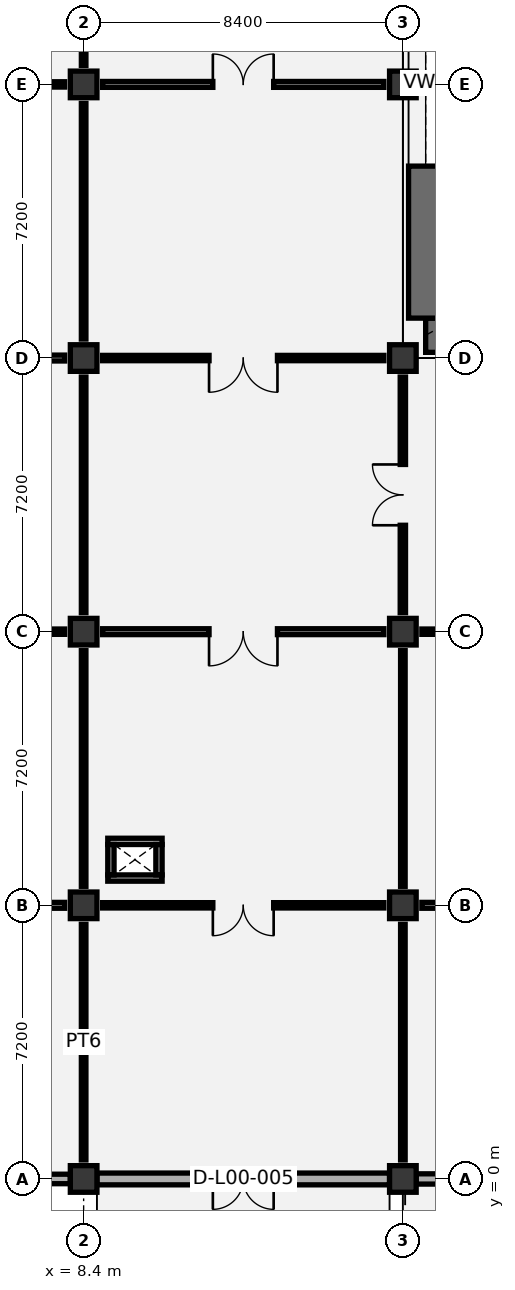
"""IFC4 building model, lengths in metres.
Left out: names, types, materials, properties, quantities, classifications, styles, units other than length and angle.
Written with IfcOpenShell. Run it as: python <this file> out.ifc"""

import sys

from ifc_helpers import new_model, si_unit, direction, frame, frame_2d, origin, origin_2d, place, context, subcontext, project, spatial, rectangle, extrude, element, fill, save


model = new_model("IFC4")
c1 = context("Model", 3, precision=1e-05, world=origin(), true_north=direction((0.0, 1.0)))
c2 = subcontext(c1, "Body", "Model", "MODEL_VIEW")
j1 = project(units=[si_unit("LENGTHUNIT", "METRE"), si_unit("PLANEANGLEUNIT", "RADIAN")], contexts=[c1])
p1 = place(None, origin())
s1 = spatial("IfcSite", under=j1, at=p1, CompositionType="ELEMENT")
p2 = place(p1, origin())
s2 = spatial("IfcBuilding", under=s1, at=p2, CompositionType="ELEMENT")
p3 = place(p2, origin())
s3 = spatial("IfcBuildingStorey", under=s2, at=p3, CompositionType="ELEMENT", Elevation=0.0)
for number, where, z_axis, x_axis in (
    (1, (8.4, 0.0, 0.0), (0.0, 0.0, 1.0), (1.0, 0.0, 0.0)),
    (2, (8.4, 7.2, 0.0), (0.0, 0.0, 1.0), (1.0, 0.0, 0.0)),
    (3, (8.4, 14.4, 0.0), (0.0, 0.0, 1.0), (1.0, 0.0, 0.0)),
    (4, (8.4, 21.6, 0.0), (0.0, 0.0, 1.0), (1.0, 0.0, 0.0)),
    (5, (8.4, 28.8, 0.0), (0.0, 0.0, 1.0), (1.0, 0.0, 0.0)),
    (6, (16.8, 0.0, 0.0), (0.0, 0.0, 1.0), (1.0, 0.0, 0.0)),
    (7, (16.8, 7.2, 0.0), (0.0, 0.0, 1.0), (1.0, 0.0, 0.0)),
    (8, (16.8, 14.4, 0.0), (0.0, 0.0, 1.0), (1.0, 0.0, 0.0)),
    (9, (16.8, 21.6, 0.0), (0.0, 0.0, 1.0), (1.0, 0.0, 0.0)),
    (10, (16.8, 28.8, 0.0), (0.0, 0.0, 1.0), (1.0, 0.0, 0.0)),
):
    element("IfcColumn", number, at=place(p3, frame(where, z_axis=z_axis, x_axis=x_axis)), inside=s3, PredefinedType="COLUMN", context=c2, shape_type="SweptSolid", body=[
        extrude(rectangle(XDim=0.7, YDim=0.7, at=origin_2d()), origin(), (0.0, 0.0, 1.0), 6.0),
    ])
p4 = place(p3, frame((17.4, 22.2, 0.0), z_axis=(0.0, 0.0, 1.0), x_axis=(1.0, 0.0, 0.0)))
e11 = element("IfcWall", 11, at=p4, inside=s3, PredefinedType="SOLIDWALL", context=c2, shape_type="SweptSolid", body=[
    extrude(rectangle(XDim=24.0, YDim=0.9, at=frame_2d((12.0, 0.0))), origin(), (0.0, 0.0, 1.0), 6.0),
])
p5 = place(p4, frame((2.4, 0.0, 0.8)))
e12 = element("IfcOpeningElement", 12, at=p5, cuts=e11, PredefinedType="OPENING", context=c2, shape_type="SweptSolid", body=[
    extrude(rectangle(XDim=6.4, YDim=3.2, at=frame_2d((3.2, 1.6))), frame((0.0, 0.46, 0.0), z_axis=(0.0, -1.0, 0.0), x_axis=(1.0, 0.0, 0.0)), (0.0, 0.0, 1.0), 0.92),
])
p6 = place(p4, frame((14.2, 0.0, 0.8)))
e13 = element("IfcOpeningElement", 13, at=p6, cuts=e11, PredefinedType="OPENING", context=c2, shape_type="SweptSolid", body=[
    extrude(rectangle(XDim=6.4, YDim=3.2, at=frame_2d((3.2, 1.6))), frame((0.0, 0.46, 0.0), z_axis=(0.0, -1.0, 0.0), x_axis=(1.0, 0.0, 0.0)), (0.0, 0.0, 1.0), 0.92),
])
p7 = place(p3, frame((17.4, 22.65, 0.0), z_axis=(0.0, 0.0, 1.0), x_axis=(0.0, 1.0, 0.0)))
e14 = element("IfcWall", 14, at=p7, inside=s3, PredefinedType="SOLIDWALL", context=c2, shape_type="SweptSolid", body=[
    extrude(rectangle(XDim=12.3, YDim=0.9, at=frame_2d((6.15, 0.0))), origin(), (0.0, 0.0, 1.0), 6.0),
])
p8 = place(p7, frame((4.0, 0.0, 0.9)))
e15 = element("IfcOpeningElement", 15, at=p8, cuts=e14, PredefinedType="OPENING", context=c2, shape_type="SweptSolid", body=[
    extrude(rectangle(XDim=4.4, YDim=2.8, at=frame_2d((2.2, 1.4))), frame((0.0, 0.46, 0.0), z_axis=(0.0, -1.0, 0.0), x_axis=(1.0, 0.0, 0.0)), (0.0, 0.0, 1.0), 0.92),
])
p9 = place(p3, frame((0.375, 0.0, 0.0), z_axis=(0.0, 0.0, 1.0), x_axis=(1.0, 0.0, 0.0)))
e16 = element("IfcWall", 16, at=p9, inside=s3, PredefinedType="SOLIDWALL", context=c2, shape_type="SweptSolid", body=[
    extrude(rectangle(XDim=7.675, YDim=0.25, at=frame_2d((3.837, 0.0))), origin(), (0.0, 0.0, 1.0), 5.12),
])
p10 = place(p9, frame((0.958, 0.0, 0.9)))
e17 = element("IfcOpeningElement", 17, at=p10, cuts=e16, PredefinedType="OPENING", context=c2, shape_type="SweptSolid", body=[
    extrude(rectangle(XDim=2.4, YDim=2.1, at=frame_2d((1.2, 1.05))), frame((0.0, 0.135, 0.0), z_axis=(0.0, -1.0, 0.0), x_axis=(1.0, 0.0, 0.0)), (0.0, 0.0, 1.0), 0.27),
])
p11 = place(p9, frame((4.317, 0.0, 0.9)))
e18 = element("IfcOpeningElement", 18, at=p11, cuts=e16, PredefinedType="OPENING", context=c2, shape_type="SweptSolid", body=[
    extrude(rectangle(XDim=2.4, YDim=2.1, at=frame_2d((1.2, 1.05))), frame((0.0, 0.135, 0.0), z_axis=(0.0, -1.0, 0.0), x_axis=(1.0, 0.0, 0.0)), (0.0, 0.0, 1.0), 0.27),
])
p12 = place(p3, frame((8.75, 0.0, 0.0), z_axis=(0.0, 0.0, 1.0), x_axis=(1.0, 0.0, 0.0)))
e19 = element("IfcWall", 19, at=p12, inside=s3, PredefinedType="SOLIDWALL", context=c2, shape_type="SweptSolid", body=[
    extrude(rectangle(XDim=7.7, YDim=0.31, at=frame_2d((3.85, 0.0))), origin(), (0.0, 0.0, 1.0), 5.12),
])
p13 = place(p12, frame((3.05, 0.0, 0.0)))
e20 = element("IfcOpeningElement", 20, at=p13, cuts=e19, PredefinedType="OPENING", context=c2, shape_type="SweptSolid", body=[
    extrude(rectangle(XDim=1.6, YDim=2.25, at=frame_2d((0.8, 1.125))), frame((0.0, 0.165, 0.0), z_axis=(0.0, -1.0, 0.0), x_axis=(1.0, 0.0, 0.0)), (0.0, 0.0, 1.0), 0.33),
])
p14 = place(p3, frame((17.15, 0.0, 0.0), z_axis=(0.0, 0.0, 1.0), x_axis=(1.0, 0.0, 0.0)))
e21 = element("IfcWall", 21, at=p14, inside=s3, PredefinedType="SOLIDWALL", context=c2, shape_type="SweptSolid", body=[
    extrude(rectangle(XDim=7.7, YDim=0.27, at=frame_2d((3.85, 0.0))), origin(), (0.0, 0.0, 1.0), 5.02),
])
p15 = place(p14, frame((2.75, 0.0, 0.0)))
e22 = element("IfcOpeningElement", 22, at=p15, cuts=e21, PredefinedType="OPENING", context=c2, shape_type="SweptSolid", body=[
    extrude(rectangle(XDim=2.2, YDim=2.45, at=frame_2d((1.1, 1.225))), frame((0.0, 0.145, 0.0), z_axis=(0.0, -1.0, 0.0), x_axis=(1.0, 0.0, 0.0)), (0.0, 0.0, 1.0), 0.29),
])
for number, where, z_axis, x_axis in (
    (23, (9.035, 7.917, 0.0), (0.0, 0.0, 1.0), (1.0, 0.0, 0.0)),
    (24, (9.035, 8.883, 0.0), (0.0, 0.0, 1.0), (1.0, 0.0, 0.0)),
):
    element("IfcWall", number, at=place(p3, frame(where, z_axis=z_axis, x_axis=x_axis)), inside=s3, PredefinedType="PARTITIONING", context=c2, shape_type="SweptSolid", body=[
        extrude(rectangle(XDim=1.43, YDim=0.165, at=frame_2d((0.715, 0.0))), origin(), (0.0, 0.0, 1.0), 5.675),
    ])
for number, where, z_axis, x_axis in (
    (25, (9.117, 8.0, 0.0), (0.0, 0.0, 1.0), (0.0, 1.0, 0.0)),
    (26, (10.383, 8.0, 0.0), (0.0, 0.0, 1.0), (0.0, 1.0, 0.0)),
):
    element("IfcWall", number, at=place(p3, frame(where, z_axis=z_axis, x_axis=x_axis)), inside=s3, PredefinedType="PARTITIONING", context=c2, shape_type="SweptSolid", body=[
        extrude(rectangle(XDim=0.8, YDim=0.165, at=frame_2d((0.4, 0.0))), origin(), (0.0, 0.0, 1.0), 5.675),
    ])
p16 = place(p3, frame((8.4, 0.5, 0.0), z_axis=(0.0, 0.0, 1.0), x_axis=(0.0, 1.0, 0.0)))
e27 = element("IfcWall", 27, at=p16, inside=s3, PredefinedType="PARTITIONING", context=c2, shape_type="SweptSolid", body=[
    extrude(rectangle(XDim=6.2, YDim=0.12, at=frame_2d((3.1, 0.0))), origin(), (0.0, 0.0, 1.0), 5.02),
])
p17 = place(p3, frame((0.5, 7.2, 0.0), z_axis=(0.0, 0.0, 1.0), x_axis=(1.0, 0.0, 0.0)))
e28 = element("IfcWall", 28, at=p17, inside=s3, PredefinedType="PARTITIONING", context=c2, shape_type="SweptSolid", body=[
    extrude(rectangle(XDim=7.4, YDim=0.155, at=frame_2d((3.7, 0.0))), origin(), (0.0, 0.0, 1.0), 4.97),
])
p18 = place(p17, frame((2.8, 0.0, 0.0)))
e29 = element("IfcOpeningElement", 29, at=p18, cuts=e28, PredefinedType="OPENING", context=c2, shape_type="SweptSolid", body=[
    extrude(rectangle(XDim=1.8, YDim=2.25, at=frame_2d((0.9, 1.125))), frame((0.0, 0.087, 0.0), z_axis=(0.0, -1.0, 0.0), x_axis=(1.0, 0.0, 0.0)), (0.0, 0.0, 1.0), 0.175),
])
p19 = place(p3, frame((8.4, 7.7, 0.0), z_axis=(0.0, 0.0, 1.0), x_axis=(0.0, 1.0, 0.0)))
e30 = element("IfcWall", 30, at=p19, inside=s3, PredefinedType="PARTITIONING", context=c2, shape_type="SweptSolid", body=[
    extrude(rectangle(XDim=6.2, YDim=0.12, at=frame_2d((3.1, 0.0))), origin(), (0.0, 0.0, 1.0), 5.48),
])
p20 = place(p3, frame((0.5, 14.4, 0.0), z_axis=(0.0, 0.0, 1.0), x_axis=(1.0, 0.0, 0.0)))
e31 = element("IfcWall", 31, at=p20, inside=s3, PredefinedType="PARTITIONING", context=c2, shape_type="SweptSolid", body=[
    extrude(rectangle(XDim=7.4, YDim=0.14, at=frame_2d((3.7, 0.0))), origin(), (0.0, 0.0, 1.0), 4.87),
])
p21 = place(p20, frame((2.9, 0.0, 0.0)))
e32 = element("IfcOpeningElement", 32, at=p21, cuts=e31, PredefinedType="OPENING", context=c2, shape_type="SweptSolid", body=[
    extrude(rectangle(XDim=1.6, YDim=2.2, at=frame_2d((0.8, 1.1))), frame((0.0, 0.08, 0.0), z_axis=(0.0, -1.0, 0.0), x_axis=(1.0, 0.0, 0.0)), (0.0, 0.0, 1.0), 0.16),
])
p22 = place(p3, frame((8.4, 14.9, 0.0), z_axis=(0.0, 0.0, 1.0), x_axis=(0.0, 1.0, 0.0)))
e33 = element("IfcWall", 33, at=p22, inside=s3, PredefinedType="PARTITIONING", context=c2, shape_type="SweptSolid", body=[
    extrude(rectangle(XDim=6.2, YDim=0.12, at=frame_2d((3.1, 0.0))), origin(), (0.0, 0.0, 1.0), 4.92),
])
p23 = place(p3, frame((0.5, 21.6, 0.0), z_axis=(0.0, 0.0, 1.0), x_axis=(1.0, 0.0, 0.0)))
e34 = element("IfcWall", 34, at=p23, inside=s3, PredefinedType="PARTITIONING", context=c2, shape_type="SweptSolid", body=[
    extrude(rectangle(XDim=7.4, YDim=0.155, at=frame_2d((3.7, 0.0))), origin(), (0.0, 0.0, 1.0), 4.87),
])
p24 = place(p23, frame((2.8, 0.0, 0.0)))
e35 = element("IfcOpeningElement", 35, at=p24, cuts=e34, PredefinedType="OPENING", context=c2, shape_type="SweptSolid", body=[
    extrude(rectangle(XDim=1.8, YDim=2.25, at=frame_2d((0.9, 1.125))), frame((0.0, 0.087, 0.0), z_axis=(0.0, -1.0, 0.0), x_axis=(1.0, 0.0, 0.0)), (0.0, 0.0, 1.0), 0.175),
])
p25 = place(p3, frame((8.4, 22.1, 0.0), z_axis=(0.0, 0.0, 1.0), x_axis=(0.0, 1.0, 0.0)))
e36 = element("IfcWall", 36, at=p25, inside=s3, PredefinedType="PARTITIONING", context=c2, shape_type="SweptSolid", body=[
    extrude(rectangle(XDim=6.2, YDim=0.12, at=frame_2d((3.1, 0.0))), origin(), (0.0, 0.0, 1.0), 5.17),
])
p26 = place(p3, frame((0.5, 28.8, 0.0), z_axis=(0.0, 0.0, 1.0), x_axis=(1.0, 0.0, 0.0)))
e37 = element("IfcWall", 37, at=p26, inside=s3, PredefinedType="PARTITIONING", context=c2, shape_type="SweptSolid", body=[
    extrude(rectangle(XDim=7.4, YDim=0.14, at=frame_2d((3.7, 0.0))), origin(), (0.0, 0.0, 1.0), 4.87),
])
p27 = place(p26, frame((2.9, 0.0, 0.0)))
e38 = element("IfcOpeningElement", 38, at=p27, cuts=e37, PredefinedType="OPENING", context=c2, shape_type="SweptSolid", body=[
    extrude(rectangle(XDim=1.6, YDim=2.2, at=frame_2d((0.8, 1.1))), frame((0.0, 0.08, 0.0), z_axis=(0.0, -1.0, 0.0), x_axis=(1.0, 0.0, 0.0)), (0.0, 0.0, 1.0), 0.16),
])
p28 = place(p3, frame((8.4, 29.3, 0.0), z_axis=(0.0, 0.0, 1.0), x_axis=(0.0, 1.0, 0.0)))
e39 = element("IfcWall", 39, at=p28, inside=s3, PredefinedType="PARTITIONING", context=c2, shape_type="SweptSolid", body=[
    extrude(rectangle(XDim=6.2, YDim=0.12, at=frame_2d((3.1, 0.0))), origin(), (0.0, 0.0, 1.0), 4.92),
])
p29 = place(p3, frame((16.8, 0.5, 0.0), z_axis=(0.0, 0.0, 1.0), x_axis=(0.0, 1.0, 0.0)))
e40 = element("IfcWall", 40, at=p29, inside=s3, PredefinedType="PARTITIONING", context=c2, shape_type="SweptSolid", body=[
    extrude(rectangle(XDim=6.2, YDim=0.12, at=frame_2d((3.1, 0.0))), origin(), (0.0, 0.0, 1.0), 5.38),
])
p30 = place(p3, frame((8.9, 7.2, 0.0), z_axis=(0.0, 0.0, 1.0), x_axis=(1.0, 0.0, 0.0)))
e41 = element("IfcWall", 41, at=p30, inside=s3, PredefinedType="PARTITIONING", context=c2, shape_type="SweptSolid", body=[
    extrude(rectangle(XDim=7.4, YDim=0.14, at=frame_2d((3.7, 0.0))), origin(), (0.0, 0.0, 1.0), 4.97),
])
p31 = place(p30, frame((2.9, 0.0, 0.0)))
e42 = element("IfcOpeningElement", 42, at=p31, cuts=e41, PredefinedType="OPENING", context=c2, shape_type="SweptSolid", body=[
    extrude(rectangle(XDim=1.6, YDim=2.2, at=frame_2d((0.8, 1.1))), frame((0.0, 0.08, 0.0), z_axis=(0.0, -1.0, 0.0), x_axis=(1.0, 0.0, 0.0)), (0.0, 0.0, 1.0), 0.16),
])
p32 = place(p3, frame((16.8, 7.7, 0.0), z_axis=(0.0, 0.0, 1.0), x_axis=(0.0, 1.0, 0.0)))
e43 = element("IfcWall", 43, at=p32, inside=s3, PredefinedType="PARTITIONING", context=c2, shape_type="SweptSolid", body=[
    extrude(rectangle(XDim=6.2, YDim=0.12, at=frame_2d((3.1, 0.0))), origin(), (0.0, 0.0, 1.0), 4.92),
])
p33 = place(p3, frame((8.9, 14.4, 0.0), z_axis=(0.0, 0.0, 1.0), x_axis=(1.0, 0.0, 0.0)))
e44 = element("IfcWall", 44, at=p33, inside=s3, PredefinedType="PARTITIONING", context=c2, shape_type="SweptSolid", body=[
    extrude(rectangle(XDim=7.4, YDim=0.155, at=frame_2d((3.7, 0.0))), origin(), (0.0, 0.0, 1.0), 4.87),
])
p34 = place(p33, frame((2.8, 0.0, 0.0)))
e45 = element("IfcOpeningElement", 45, at=p34, cuts=e44, PredefinedType="OPENING", context=c2, shape_type="SweptSolid", body=[
    extrude(rectangle(XDim=1.8, YDim=2.25, at=frame_2d((0.9, 1.125))), frame((0.0, 0.087, 0.0), z_axis=(0.0, -1.0, 0.0), x_axis=(1.0, 0.0, 0.0)), (0.0, 0.0, 1.0), 0.175),
])
p35 = place(p3, frame((16.8, 14.9, 0.0), z_axis=(0.0, 0.0, 1.0), x_axis=(0.0, 1.0, 0.0)))
e46 = element("IfcWall", 46, at=p35, inside=s3, PredefinedType="PARTITIONING", context=c2, shape_type="SweptSolid", body=[
    extrude(rectangle(XDim=6.2, YDim=0.14, at=frame_2d((3.1, 0.0))), origin(), (0.0, 0.0, 1.0), 5.02),
])
p36 = place(p35, frame((2.3, 0.0, 0.0)))
e47 = element("IfcOpeningElement", 47, at=p36, cuts=e46, PredefinedType="OPENING", context=c2, shape_type="SweptSolid", body=[
    extrude(rectangle(XDim=1.6, YDim=2.2, at=frame_2d((0.8, 1.1))), frame((0.0, 0.08, 0.0), z_axis=(0.0, -1.0, 0.0), x_axis=(1.0, 0.0, 0.0)), (0.0, 0.0, 1.0), 0.16),
])
p37 = place(p3, frame((8.9, 21.6, 0.0), z_axis=(0.0, 0.0, 1.0), x_axis=(1.0, 0.0, 0.0)))
e48 = element("IfcWall", 48, at=p37, inside=s3, PredefinedType="PARTITIONING", context=c2, shape_type="SweptSolid", body=[
    extrude(rectangle(XDim=7.4, YDim=0.14, at=frame_2d((3.7, 0.0))), origin(), (0.0, 0.0, 1.0), 4.87),
])
p38 = place(p37, frame((2.8, 0.0, 0.0)))
e49 = element("IfcOpeningElement", 49, at=p38, cuts=e48, PredefinedType="OPENING", context=c2, shape_type="SweptSolid", body=[
    extrude(rectangle(XDim=1.8, YDim=2.25, at=frame_2d((0.9, 1.125))), frame((0.0, 0.08, 0.0), z_axis=(0.0, -1.0, 0.0), x_axis=(1.0, 0.0, 0.0)), (0.0, 0.0, 1.0), 0.16),
])
p39 = place(p3, frame((8.9, 28.8, 0.0), z_axis=(0.0, 0.0, 1.0), x_axis=(1.0, 0.0, 0.0)))
e50 = element("IfcWall", 50, at=p39, inside=s3, PredefinedType="PARTITIONING", context=c2, shape_type="SweptSolid", body=[
    extrude(rectangle(XDim=7.4, YDim=0.155, at=frame_2d((3.7, 0.0))), origin(), (0.0, 0.0, 1.0), 4.87),
])
p40 = place(p39, frame((2.9, 0.0, 0.0)))
e51 = element("IfcOpeningElement", 51, at=p40, cuts=e50, PredefinedType="OPENING", context=c2, shape_type="SweptSolid", body=[
    extrude(rectangle(XDim=1.6, YDim=2.2, at=frame_2d((0.8, 1.1))), frame((0.0, 0.087, 0.0), z_axis=(0.0, -1.0, 0.0), x_axis=(1.0, 0.0, 0.0)), (0.0, 0.0, 1.0), 0.175),
])
p41 = place(p3, frame((17.3, 7.2, 0.0), z_axis=(0.0, 0.0, 1.0), x_axis=(1.0, 0.0, 0.0)))
e52 = element("IfcWall", 52, at=p41, inside=s3, PredefinedType="PARTITIONING", context=c2, shape_type="SweptSolid", body=[
    extrude(rectangle(XDim=7.4, YDim=0.155, at=frame_2d((3.7, 0.0))), origin(), (0.0, 0.0, 1.0), 4.87),
])
p42 = place(p41, frame((2.9, 0.0, 0.0)))
e53 = element("IfcOpeningElement", 53, at=p42, cuts=e52, PredefinedType="OPENING", context=c2, shape_type="SweptSolid", body=[
    extrude(rectangle(XDim=1.6, YDim=2.2, at=frame_2d((0.8, 1.1))), frame((0.0, 0.087, 0.0), z_axis=(0.0, -1.0, 0.0), x_axis=(1.0, 0.0, 0.0)), (0.0, 0.0, 1.0), 0.175),
])
p43 = place(p3, frame((17.3, 14.4, 0.0), z_axis=(0.0, 0.0, 1.0), x_axis=(1.0, 0.0, 0.0)))
e54 = element("IfcWall", 54, at=p43, inside=s3, PredefinedType="PARTITIONING", context=c2, shape_type="SweptSolid", body=[
    extrude(rectangle(XDim=7.4, YDim=0.14, at=frame_2d((3.7, 0.0))), origin(), (0.0, 0.0, 1.0), 5.02),
])
p44 = place(p43, frame((2.8, 0.0, 0.0)))
e55 = element("IfcOpeningElement", 55, at=p44, cuts=e54, PredefinedType="OPENING", context=c2, shape_type="SweptSolid", body=[
    extrude(rectangle(XDim=1.8, YDim=2.25, at=frame_2d((0.9, 1.125))), frame((0.0, 0.08, 0.0), z_axis=(0.0, -1.0, 0.0), x_axis=(1.0, 0.0, 0.0)), (0.0, 0.0, 1.0), 0.16),
])
p45 = place(p13, frame((1.6, 0.0, 0.0), z_axis=(0.0, 0.0, 1.0), x_axis=(-1.0, 0.0, 0.0)))
e56 = element("IfcDoor", 56, at=p45, inside=s3, OperationType="DOUBLE_DOOR_SINGLE_SWING", PredefinedType="DOOR", context=c2, shape_type="SweptSolid", body=[
    extrude(rectangle(XDim=1.6, YDim=2.25, at=frame_2d((0.8, 1.125))), frame((0.0, 0.025, 0.0), z_axis=(0.0, -1.0, 0.0), x_axis=(1.0, 0.0, 0.0)), (0.0, 0.0, 1.0), 0.05),
])
fill(e20, e56)
p46 = place(p8, origin())
e57 = element("IfcWindow", 57, at=p46, inside=s3, PartitioningType="SINGLE_PANEL", PredefinedType="WINDOW", context=c2, shape_type="SweptSolid", body=[
    extrude(rectangle(XDim=4.4, YDim=2.8, at=frame_2d((2.2, 1.4))), frame((0.0, 0.175, 0.0), z_axis=(0.0, -1.0, 0.0), x_axis=(1.0, 0.0, 0.0)), (0.0, 0.0, 1.0), 0.35),
])
fill(e15, e57)
p47 = place(p31, frame((1.6, 0.0, 0.0), z_axis=(0.0, 0.0, 1.0), x_axis=(-1.0, 0.0, 0.0)))
e58 = element("IfcDoor", 58, at=p47, inside=s3, OperationType="DOUBLE_DOOR_SINGLE_SWING", PredefinedType="DOOR", context=c2, shape_type="SweptSolid", body=[
    extrude(rectangle(XDim=1.6, YDim=2.2, at=frame_2d((0.8, 1.1))), frame((0.0, 0.025, 0.0), z_axis=(0.0, -1.0, 0.0), x_axis=(1.0, 0.0, 0.0)), (0.0, 0.0, 1.0), 0.05),
])
fill(e42, e58)
p48 = place(p34, frame((1.8, 0.0, 0.0), z_axis=(0.0, 0.0, 1.0), x_axis=(-1.0, 0.0, 0.0)))
e59 = element("IfcDoor", 59, at=p48, inside=s3, OperationType="DOUBLE_DOOR_SINGLE_SWING", PredefinedType="DOOR", context=c2, shape_type="SweptSolid", body=[
    extrude(rectangle(XDim=1.8, YDim=2.25, at=frame_2d((0.9, 1.125))), frame((0.0, 0.025, 0.0), z_axis=(0.0, -1.0, 0.0), x_axis=(1.0, 0.0, 0.0)), (0.0, 0.0, 1.0), 0.05),
])
fill(e45, e59)
p49 = place(p36, origin())
e60 = element("IfcDoor", 60, at=p49, inside=s3, OperationType="DOUBLE_DOOR_SINGLE_SWING", PredefinedType="DOOR", context=c2, shape_type="SweptSolid", body=[
    extrude(rectangle(XDim=1.6, YDim=2.2, at=frame_2d((0.8, 1.1))), frame((0.0, 0.025, 0.0), z_axis=(0.0, -1.0, 0.0), x_axis=(1.0, 0.0, 0.0)), (0.0, 0.0, 1.0), 0.05),
])
fill(e47, e60)
p50 = place(p38, frame((1.8, 0.0, 0.0), z_axis=(0.0, 0.0, 1.0), x_axis=(-1.0, 0.0, 0.0)))
e61 = element("IfcDoor", 61, at=p50, inside=s3, OperationType="DOUBLE_DOOR_SINGLE_SWING", PredefinedType="DOOR", context=c2, shape_type="SweptSolid", body=[
    extrude(rectangle(XDim=1.8, YDim=2.25, at=frame_2d((0.9, 1.125))), frame((0.0, 0.025, 0.0), z_axis=(0.0, -1.0, 0.0), x_axis=(1.0, 0.0, 0.0)), (0.0, 0.0, 1.0), 0.05),
])
fill(e49, e61)
p51 = place(p40, origin())
e62 = element("IfcDoor", 62, at=p51, inside=s3, OperationType="DOUBLE_DOOR_SINGLE_SWING", PredefinedType="DOOR", context=c2, shape_type="SweptSolid", body=[
    extrude(rectangle(XDim=1.6, YDim=2.2, at=frame_2d((0.8, 1.1))), frame((0.0, 0.025, 0.0), z_axis=(0.0, -1.0, 0.0), x_axis=(1.0, 0.0, 0.0)), (0.0, 0.0, 1.0), 0.05),
])
fill(e51, e62)
save(model, sys.argv[1])
